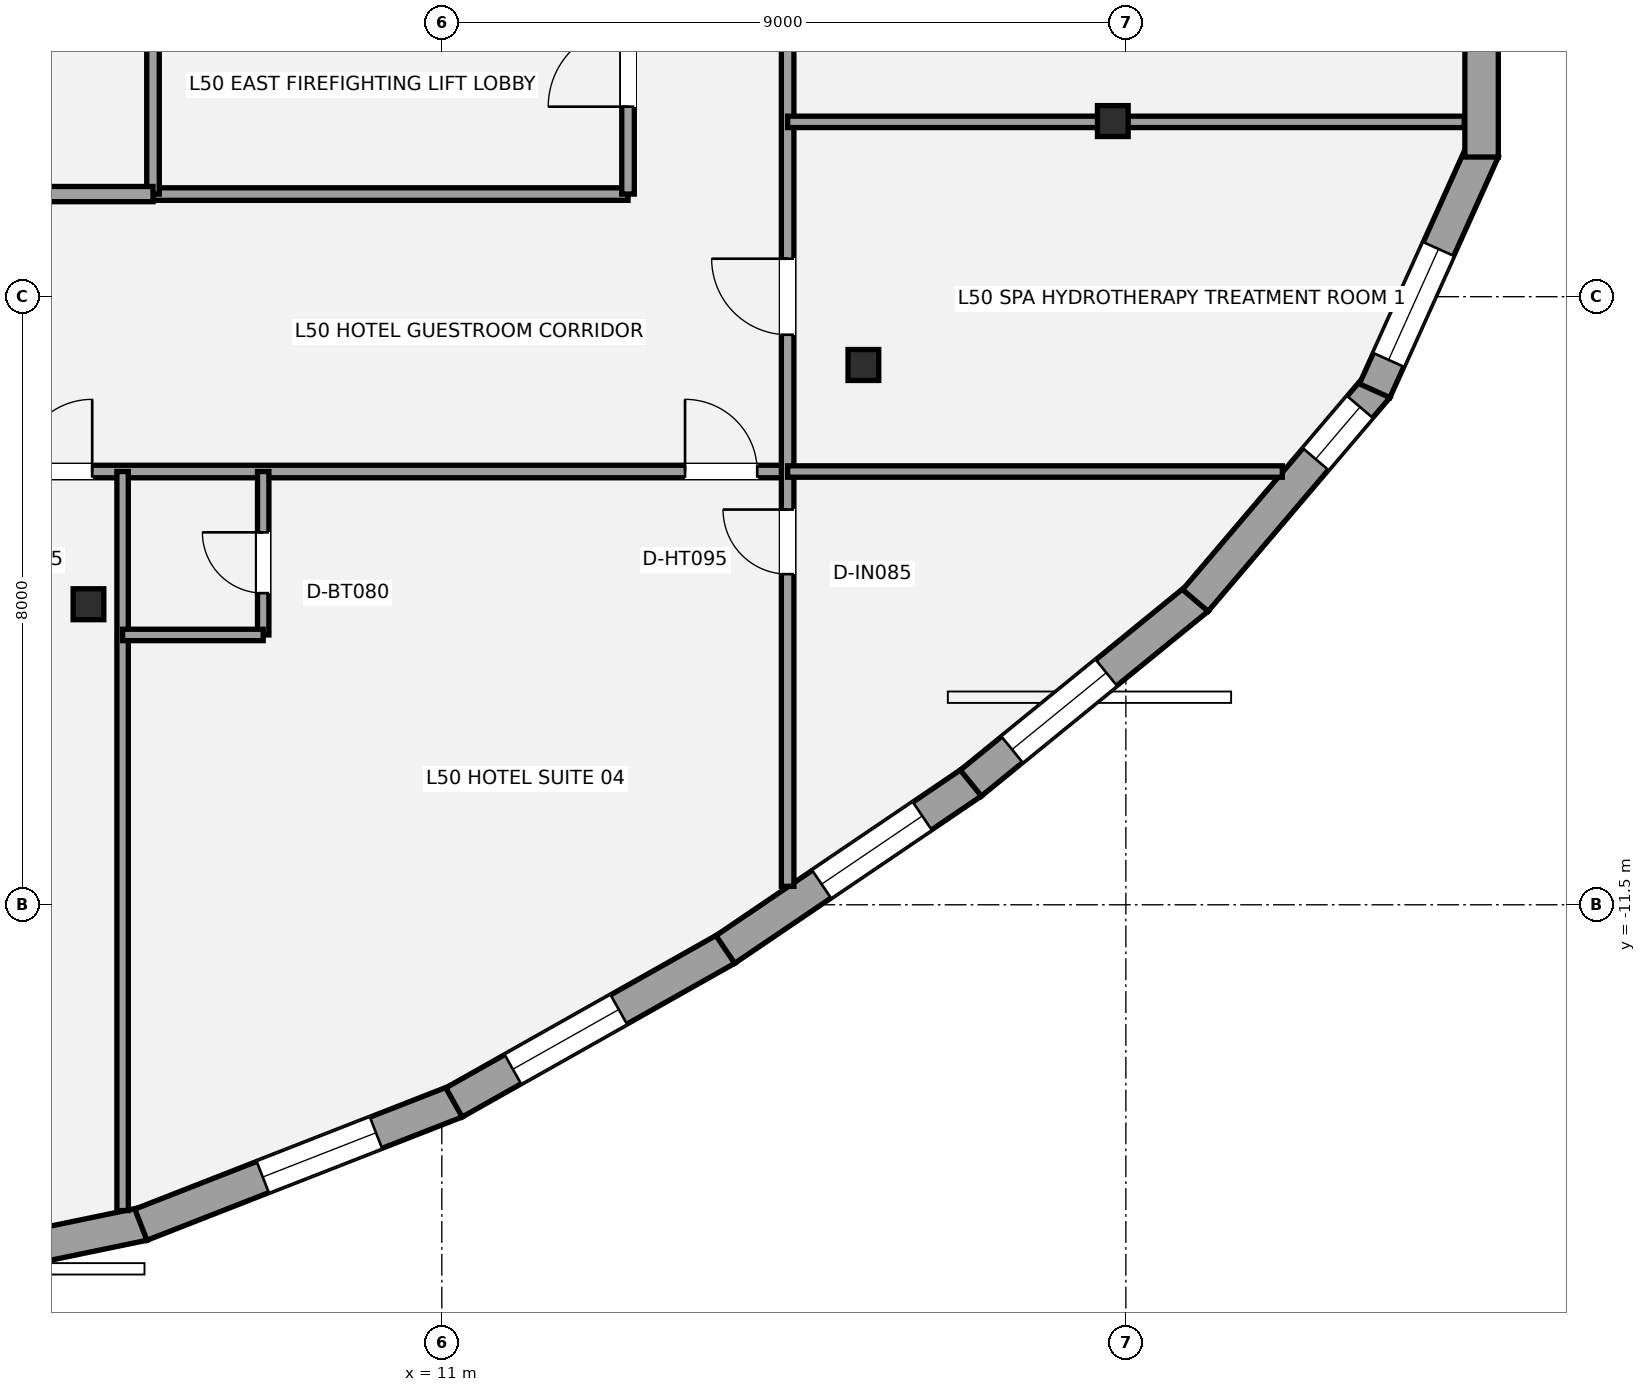
"""IFC4 building model, lengths in metres.
Left out: names, types, materials, properties, quantities, classifications, styles, units other than length and angle.
Written with IfcOpenShell. Run it as: python <this file> out.ifc"""

import sys

from ifc_helpers import new_model, si_unit, direction, frame, frame_2d, origin, origin_2d, place, context, subcontext, project, spatial, rectangle, i_section, extrude, element, fill, save


model = new_model("IFC4")
c1 = context("Model", 3, precision=1e-05, world=origin(), true_north=direction((0.0, 1.0)))
c2 = subcontext(c1, "Body", "Model", "MODEL_VIEW")
j1 = project(units=[si_unit("LENGTHUNIT", "METRE"), si_unit("PLANEANGLEUNIT", "RADIAN")], contexts=[c1])
p1 = place(None, origin())
s1 = spatial("IfcSite", under=j1, at=p1, CompositionType="ELEMENT")
p2 = place(p1, origin())
s2 = spatial("IfcBuilding", under=s1, at=p2, CompositionType="ELEMENT")
p3 = place(p2, frame((0.0, 0.0, 182.2)))
s3 = spatial("IfcBuildingStorey", under=s2, at=p3, CompositionType="ELEMENT", Elevation=182.2)
for number, where, z_axis, x_axis in (
    (1, (6.351, -7.546, 0.0), (0.0, 0.0, 1.0), (1.0, 0.0, 0.0)),
    (2, (16.547, -4.398, 0.0), (0.0, 0.0, 1.0), (1.0, 0.0, 0.0)),
    (3, (19.828, -1.189, 0.0), (0.0, 0.0, 1.0), (1.0, 0.0, 0.0)),
):
    element("IfcColumn", number, at=place(p3, frame(where, z_axis=z_axis, x_axis=x_axis)), inside=s3, PredefinedType="COLUMN", context=c2, shape_type="SweptSolid", body=[
        extrude(i_section(OverallWidth=0.404, OverallDepth=0.407, WebThickness=0.027, FlangeThickness=0.044, at=origin_2d()), origin(), (0.0, 0.0, 1.0), 3.2),
    ])
p4 = place(p3, frame((7.076, -15.698, 0.0), z_axis=(0.0, 0.0, 1.0), x_axis=(-0.979222564836, -0.202788482206, 0.0)))
e4 = element("IfcWall", 4, at=p4, inside=s3, PredefinedType="STANDARD", context=c2, shape_type="SweptSolid", body=[
    extrude(rectangle(XDim=4.768, YDim=0.44, at=frame_2d((2.384, 0.0))), origin(), (0.0, 0.0, 1.0), 2.315),
])
p5 = place(p4, frame((1.781, 0.0, 0.58)))
e5 = element("IfcOpeningElement", 5, at=p5, cuts=e4, PredefinedType="OPENING", context=c2, shape_type="SweptSolid", body=[
    extrude(rectangle(XDim=1.6, YDim=1.55, at=frame_2d((0.8, 0.775))), frame((0.0, 0.23, 0.0), z_axis=(0.0, -1.0, 0.0), x_axis=(1.0, 0.0, 0.0)), (0.0, 0.0, 1.0), 0.46),
])
p6 = place(p3, frame((11.188, -14.087, 0.0), z_axis=(0.0, 0.0, 1.0), x_axis=(-0.93133333838, -0.364167836062, 0.0)))
e6 = element("IfcWall", 6, at=p6, inside=s3, PredefinedType="STANDARD", context=c2, shape_type="SweptSolid", body=[
    extrude(rectangle(XDim=4.454, YDim=0.44, at=frame_2d((2.227, 0.0))), origin(), (0.0, 0.0, 1.0), 2.315),
])
p7 = place(p6, frame((1.132, 0.0, 0.58)))
e7 = element("IfcOpeningElement", 7, at=p7, cuts=e6, PredefinedType="OPENING", context=c2, shape_type="SweptSolid", body=[
    extrude(rectangle(XDim=1.6, YDim=1.55, at=frame_2d((0.8, 0.775))), frame((0.0, 0.23, 0.0), z_axis=(0.0, -1.0, 0.0), x_axis=(1.0, 0.0, 0.0)), (0.0, 0.0, 1.0), 0.46),
])
p8 = place(p3, frame((14.746, -12.078, 0.0), z_axis=(0.0, 0.0, 1.0), x_axis=(-0.871039635509, -0.491212737388, 0.0)))
e8 = element("IfcWall", 8, at=p8, inside=s3, PredefinedType="STANDARD", context=c2, shape_type="SweptSolid", body=[
    extrude(rectangle(XDim=4.116, YDim=0.44, at=frame_2d((2.058, 0.0))), origin(), (0.0, 0.0, 1.0), 2.315),
])
p9 = place(p8, frame((1.627, 0.0, 0.58)))
e9 = element("IfcOpeningElement", 9, at=p9, cuts=e8, PredefinedType="OPENING", context=c2, shape_type="SweptSolid", body=[
    extrude(rectangle(XDim=1.6, YDim=1.55, at=frame_2d((0.8, 0.775))), frame((0.0, 0.23, 0.0), z_axis=(0.0, -1.0, 0.0), x_axis=(1.0, 0.0, 0.0)), (0.0, 0.0, 1.0), 0.46),
])
p10 = place(p3, frame((17.976, -9.888, 0.0), z_axis=(0.0, 0.0, 1.0), x_axis=(-0.827733986143, -0.561120707321, 0.0)))
e10 = element("IfcWall", 10, at=p10, inside=s3, PredefinedType="STANDARD", context=c2, shape_type="SweptSolid", body=[
    extrude(rectangle(XDim=3.921, YDim=0.44, at=frame_2d((1.96, 0.0))), origin(), (0.0, 0.0, 1.0), 2.315),
])
p11 = place(p10, frame((0.791, 0.0, 0.58)))
e11 = element("IfcOpeningElement", 11, at=p11, cuts=e10, PredefinedType="OPENING", context=c2, shape_type="SweptSolid", body=[
    extrude(rectangle(XDim=1.6, YDim=1.55, at=frame_2d((0.8, 0.775))), frame((0.0, 0.23, 0.0), z_axis=(0.0, -1.0, 0.0), x_axis=(1.0, 0.0, 0.0)), (0.0, 0.0, 1.0), 0.46),
])
p12 = place(p3, frame((20.943, -7.469, 0.0), z_axis=(0.0, 0.0, 1.0), x_axis=(-0.77522232587, -0.631688487684, 0.0)))
e12 = element("IfcWall", 12, at=p12, inside=s3, PredefinedType="STANDARD", context=c2, shape_type="SweptSolid", body=[
    extrude(rectangle(XDim=3.847, YDim=0.44, at=frame_2d((1.924, 0.0))), origin(), (0.0, 0.0, 1.0), 2.315),
])
p13 = place(p12, frame((1.548, 0.0, 0.58)))
e13 = element("IfcOpeningElement", 13, at=p13, cuts=e12, PredefinedType="OPENING", context=c2, shape_type="SweptSolid", body=[
    extrude(rectangle(XDim=1.6, YDim=1.55, at=frame_2d((0.8, 0.775))), frame((0.0, 0.23, 0.0), z_axis=(0.0, -1.0, 0.0), x_axis=(1.0, 0.0, 0.0)), (0.0, 0.0, 1.0), 0.46),
])
p14 = place(p3, frame((23.307, -4.685, 0.0), z_axis=(0.0, 0.0, 1.0), x_axis=(-0.648014991522, -0.761627580096, 0.0)))
e14 = element("IfcWall", 14, at=p14, inside=s3, PredefinedType="STANDARD", context=c2, shape_type="SweptSolid", body=[
    extrude(rectangle(XDim=3.692, YDim=0.44, at=frame_2d((1.846, 0.0))), origin(), (0.0, 0.0, 1.0), 2.315),
])
p15 = place(p14, frame((0.35, 0.0, 0.58)))
e15 = element("IfcOpeningElement", 15, at=p15, cuts=e14, PredefinedType="OPENING", context=c2, shape_type="SweptSolid", body=[
    extrude(rectangle(XDim=0.9, YDim=1.35, at=frame_2d((0.45, 0.675))), frame((0.0, 0.23, 0.0), z_axis=(0.0, -1.0, 0.0), x_axis=(1.0, 0.0, 0.0)), (0.0, 0.0, 1.0), 0.46),
])
p16 = place(p3, frame((24.7, -1.572, 0.0), z_axis=(0.0, 0.0, 1.0), x_axis=(-0.410812065386, -0.911720048553, 0.0)))
e16 = element("IfcWall", 16, at=p16, inside=s3, PredefinedType="STANDARD", context=c2, shape_type="SweptSolid", body=[
    extrude(rectangle(XDim=3.471, YDim=0.44, at=frame_2d((1.736, 0.0))), origin(), (0.0, 0.0, 1.0), 2.315),
])
p17 = place(p16, frame((1.426, 0.0, 0.58)))
e17 = element("IfcOpeningElement", 17, at=p17, cuts=e16, PredefinedType="OPENING", context=c2, shape_type="SweptSolid", body=[
    extrude(rectangle(XDim=1.6, YDim=1.55, at=frame_2d((0.8, 0.775))), frame((0.0, 0.23, 0.0), z_axis=(0.0, -1.0, 0.0), x_axis=(1.0, 0.0, 0.0)), (0.0, 0.0, 1.0), 0.46),
])
p18 = place(p3, frame((24.68, 1.663, 0.0), z_axis=(0.0, 0.0, 1.0), x_axis=(0.0, -1.0, 0.0)))
e18 = element("IfcWall", 18, at=p18, inside=s3, PredefinedType="STANDARD", context=c2, shape_type="SweptSolid", body=[
    extrude(rectangle(XDim=3.325, YDim=0.44, at=frame_2d((1.663, 0.0))), origin(), (0.0, 0.0, 1.0), 2.315),
])
p19 = place(p18, frame((0.298, 0.0, 0.58)))
e19 = element("IfcOpeningElement", 19, at=p19, cuts=e18, PredefinedType="OPENING", context=c2, shape_type="SweptSolid", body=[
    extrude(rectangle(XDim=1.6, YDim=1.55, at=frame_2d((0.8, 0.775))), frame((0.0, 0.23, 0.0), z_axis=(0.0, -1.0, 0.0), x_axis=(1.0, 0.0, 0.0)), (0.0, 0.0, 1.0), 0.46),
])
p20 = place(p3, frame((7.2, -2.15, 0.0), z_axis=(0.0, 0.0, 1.0), x_axis=(1.0, 0.0, 0.0)))
e20 = element("IfcWall", 20, at=p20, inside=s3, PredefinedType="PARTITIONING", context=c2, shape_type="SweptSolid", body=[
    extrude(rectangle(XDim=6.25, YDim=0.165, at=frame_2d((3.125, 0.0))), origin(), (0.0, 0.0, 1.0), 3.02),
])
p21 = place(p3, frame((7.2, -2.15, 0.0), z_axis=(0.0, 0.0, 1.0), x_axis=(0.0, 1.0, 0.0)))
e21 = element("IfcWall", 21, at=p21, inside=s3, PredefinedType="PARTITIONING", context=c2, shape_type="SweptSolid", body=[
    extrude(rectangle(XDim=3.4, YDim=0.165, at=frame_2d((1.7, 0.0))), origin(), (0.0, 0.0, 1.0), 2.473),
])
p22 = place(p3, frame((13.45, -2.15, 0.0), z_axis=(0.0, 0.0, 1.0), x_axis=(0.0, 1.0, 0.0)))
e22 = element("IfcWall", 22, at=p22, inside=s3, PredefinedType="PARTITIONING", context=c2, shape_type="SweptSolid", body=[
    extrude(rectangle(XDim=3.4, YDim=0.165, at=frame_2d((1.7, 0.0))), origin(), (0.0, 0.0, 1.0), 2.473),
])
p23 = place(p22, frame((1.15, 0.0, 0.0)))
e23 = element("IfcOpeningElement", 23, at=p23, cuts=e22, PredefinedType="OPENING", context=c2, shape_type="SweptSolid", body=[
    extrude(rectangle(XDim=1.05, YDim=2.15, at=frame_2d((0.525, 1.075))), frame((0.0, 0.093, 0.0), z_axis=(0.0, -1.0, 0.0), x_axis=(1.0, 0.0, 0.0)), (0.0, 0.0, 1.0), 0.185),
])
p24 = place(p3, frame((4.95, -2.15, 0.0), z_axis=(0.0, 0.0, 1.0), x_axis=(1.0, 0.0, 0.0)))
e24 = element("IfcWall", 24, at=p24, inside=s3, PredefinedType="SOLIDWALL", context=c2, shape_type="SweptSolid", body=[
    extrude(rectangle(XDim=2.25, YDim=0.2, at=frame_2d((1.125, 0.0))), origin(), (0.0, 0.0, 1.0), 3.02),
])
p25 = place(p3, frame((-15.55, -5.8, 0.0), z_axis=(0.0, 0.0, 1.0), x_axis=(1.0, 0.0, 0.0)))
e25 = element("IfcWall", 25, at=p25, inside=s3, PredefinedType="PARTITIONING", context=c2, shape_type="SweptSolid", body=[
    extrude(rectangle(XDim=31.1, YDim=0.165, at=frame_2d((15.55, 0.0))), origin(), (0.0, 0.0, 1.0), 2.398),
])
p26 = place(p25, frame((5.4, 0.0, 0.0)))
e26 = element("IfcOpeningElement", 26, at=p26, cuts=e25, PredefinedType="OPENING", context=c2, shape_type="SweptSolid", body=[
    extrude(rectangle(XDim=0.95, YDim=2.15, at=frame_2d((0.475, 1.075))), frame((0.0, 0.093, 0.0), z_axis=(0.0, -1.0, 0.0), x_axis=(1.0, 0.0, 0.0)), (0.0, 0.0, 1.0), 0.185),
])
p27 = place(p25, frame((13.2, 0.0, 0.0)))
e27 = element("IfcOpeningElement", 27, at=p27, cuts=e25, PredefinedType="OPENING", context=c2, shape_type="SweptSolid", body=[
    extrude(rectangle(XDim=0.95, YDim=2.15, at=frame_2d((0.475, 1.075))), frame((0.0, 0.093, 0.0), z_axis=(0.0, -1.0, 0.0), x_axis=(1.0, 0.0, 0.0)), (0.0, 0.0, 1.0), 0.185),
])
p28 = place(p25, frame((21.0, 0.0, 0.0)))
e28 = element("IfcOpeningElement", 28, at=p28, cuts=e25, PredefinedType="OPENING", context=c2, shape_type="SweptSolid", body=[
    extrude(rectangle(XDim=0.95, YDim=2.15, at=frame_2d((0.475, 1.075))), frame((0.0, 0.093, 0.0), z_axis=(0.0, -1.0, 0.0), x_axis=(1.0, 0.0, 0.0)), (0.0, 0.0, 1.0), 0.185),
])
p29 = place(p25, frame((29.75, 0.0, 0.0)))
e29 = element("IfcOpeningElement", 29, at=p29, cuts=e25, PredefinedType="OPENING", context=c2, shape_type="SweptSolid", body=[
    extrude(rectangle(XDim=0.95, YDim=2.15, at=frame_2d((0.475, 1.075))), frame((0.0, 0.093, 0.0), z_axis=(0.0, -1.0, 0.0), x_axis=(1.0, 0.0, 0.0)), (0.0, 0.0, 1.0), 0.185),
])
p30 = place(p3, frame((15.55, -11.257, 0.0), z_axis=(0.0, 0.0, 1.0), x_axis=(0.0, 1.0, 0.0)))
e30 = element("IfcWall", 30, at=p30, inside=s3, PredefinedType="PARTITIONING", context=c2, shape_type="SweptSolid", body=[
    extrude(rectangle(XDim=18.807, YDim=0.165, at=frame_2d((9.403, 0.0))), origin(), (0.0, 0.0, 1.0), 2.473),
])
p31 = place(p30, frame((4.106, 0.0, 0.0)))
e31 = element("IfcOpeningElement", 31, at=p31, cuts=e30, PredefinedType="OPENING", context=c2, shape_type="SweptSolid", body=[
    extrude(rectangle(XDim=0.85, YDim=2.1, at=frame_2d((0.425, 1.05))), frame((0.0, 0.093, 0.0), z_axis=(0.0, -1.0, 0.0), x_axis=(1.0, 0.0, 0.0)), (0.0, 0.0, 1.0), 0.185),
])
p32 = place(p30, frame((7.257, 0.0, 0.0)))
e32 = element("IfcOpeningElement", 32, at=p32, cuts=e30, PredefinedType="OPENING", context=c2, shape_type="SweptSolid", body=[
    extrude(rectangle(XDim=1.0, YDim=2.15, at=frame_2d((0.5, 1.075))), frame((0.0, 0.093, 0.0), z_axis=(0.0, -1.0, 0.0), x_axis=(1.0, 0.0, 0.0)), (0.0, 0.0, 1.0), 0.185),
])
p33 = place(p30, frame((11.656, 0.0, 0.0)))
e33 = element("IfcOpeningElement", 33, at=p33, cuts=e30, PredefinedType="OPENING", context=c2, shape_type="SweptSolid", body=[
    extrude(rectangle(XDim=1.0, YDim=2.15, at=frame_2d((0.5, 1.075))), frame((0.0, 0.093, 0.0), z_axis=(0.0, -1.0, 0.0), x_axis=(1.0, 0.0, 0.0)), (0.0, 0.0, 1.0), 0.185),
])
p34 = place(p30, frame((16.031, 0.0, 0.0)))
e34 = element("IfcOpeningElement", 34, at=p34, cuts=e30, PredefinedType="OPENING", context=c2, shape_type="SweptSolid", body=[
    extrude(rectangle(XDim=1.0, YDim=2.15, at=frame_2d((0.5, 1.075))), frame((0.0, 0.093, 0.0), z_axis=(0.0, -1.0, 0.0), x_axis=(1.0, 0.0, 0.0)), (0.0, 0.0, 1.0), 0.185),
])
p35 = place(p3, frame((15.55, -5.8, 0.0), z_axis=(0.0, 0.0, 1.0), x_axis=(1.0, 0.0, 0.0)))
e35 = element("IfcWall", 35, at=p35, inside=s3, PredefinedType="PLUMBINGWALL", context=c2, shape_type="SweptSolid", body=[
    extrude(rectangle(XDim=6.509, YDim=0.15, at=frame_2d((3.254, 0.0))), origin(), (0.0, 0.0, 1.0), 2.473),
])
p36 = place(p3, frame((6.8, -15.523, 0.0), z_axis=(0.0, 0.0, 1.0), x_axis=(0.0, 1.0, 0.0)))
e36 = element("IfcWall", 36, at=p36, inside=s3, PredefinedType="PLUMBINGWALL", context=c2, shape_type="SweptSolid", body=[
    extrude(rectangle(XDim=9.723, YDim=0.15, at=frame_2d((4.861, 0.0))), origin(), (0.0, 0.0, 1.0), 2.473),
])
p37 = place(p3, frame((8.65, -7.95, 0.0), z_axis=(0.0, 0.0, 1.0), x_axis=(0.0, 1.0, 0.0)))
e37 = element("IfcWall", 37, at=p37, inside=s3, PredefinedType="PLUMBINGWALL", context=c2, shape_type="SweptSolid", body=[
    extrude(rectangle(XDim=2.15, YDim=0.15, at=frame_2d((1.075, 0.0))), origin(), (0.0, 0.0, 1.0), 3.02),
])
p38 = place(p37, frame((0.55, 0.0, 0.0)))
e38 = element("IfcOpeningElement", 38, at=p38, cuts=e37, PredefinedType="OPENING", context=c2, shape_type="SweptSolid", body=[
    extrude(rectangle(XDim=0.8, YDim=2.1, at=frame_2d((0.4, 1.05))), frame((0.0, 0.085, 0.0), z_axis=(0.0, -1.0, 0.0), x_axis=(1.0, 0.0, 0.0)), (0.0, 0.0, 1.0), 0.17),
])
p39 = place(p3, frame((6.8, -7.95, 0.0), z_axis=(0.0, 0.0, 1.0), x_axis=(1.0, 0.0, 0.0)))
e39 = element("IfcWall", 39, at=p39, inside=s3, PredefinedType="PLUMBINGWALL", context=c2, shape_type="SweptSolid", body=[
    extrude(rectangle(XDim=1.85, YDim=0.15, at=frame_2d((0.925, 0.0))), origin(), (0.0, 0.0, 1.0), 3.02),
])
p40 = place(p3, frame((15.55, -1.2, 0.0), z_axis=(0.0, 0.0, 1.0), x_axis=(1.0, 0.0, 0.0)))
e40 = element("IfcWall", 40, at=p40, inside=s3, PredefinedType="PLUMBINGWALL", context=c2, shape_type="SweptSolid", body=[
    extrude(rectangle(XDim=8.902, YDim=0.15, at=frame_2d((4.451, 0.0))), origin(), (0.0, 0.0, 1.0), 2.398),
])
p41 = place(p7, origin())
e41 = element("IfcWindow", 41, at=p41, inside=s3, PartitioningType="SINGLE_PANEL", PredefinedType="WINDOW", context=c2, shape_type="SweptSolid", body=[
    extrude(rectangle(XDim=1.6, YDim=1.55, at=frame_2d((0.8, 0.775))), frame((0.0, -0.01, 0.0), z_axis=(0.0, -1.0, 0.0), x_axis=(1.0, 0.0, 0.0)), (0.0, 0.0, 1.0), 0.06),
])
fill(e7, e41)
p42 = place(p9, origin())
e42 = element("IfcWindow", 42, at=p42, inside=s3, PartitioningType="SINGLE_PANEL", PredefinedType="WINDOW", context=c2, shape_type="SweptSolid", body=[
    extrude(rectangle(XDim=1.6, YDim=1.55, at=frame_2d((0.8, 0.775))), frame((0.0, -0.01, 0.0), z_axis=(0.0, -1.0, 0.0), x_axis=(1.0, 0.0, 0.0)), (0.0, 0.0, 1.0), 0.06),
])
fill(e9, e42)
p43 = place(p11, origin())
e43 = element("IfcWindow", 43, at=p43, inside=s3, PartitioningType="SINGLE_PANEL", PredefinedType="WINDOW", context=c2, shape_type="SweptSolid", body=[
    extrude(rectangle(XDim=1.6, YDim=1.55, at=frame_2d((0.8, 0.775))), frame((0.0, -0.01, 0.0), z_axis=(0.0, -1.0, 0.0), x_axis=(1.0, 0.0, 0.0)), (0.0, 0.0, 1.0), 0.06),
])
fill(e11, e43)
p44 = place(p13, origin())
e44 = element("IfcWindow", 44, at=p44, inside=s3, PartitioningType="SINGLE_PANEL", PredefinedType="WINDOW", context=c2, shape_type="SweptSolid", body=[
    extrude(rectangle(XDim=1.6, YDim=1.55, at=frame_2d((0.8, 0.775))), frame((0.0, -0.01, 0.0), z_axis=(0.0, -1.0, 0.0), x_axis=(1.0, 0.0, 0.0)), (0.0, 0.0, 1.0), 0.06),
])
fill(e13, e44)
p45 = place(p15, origin())
e45 = element("IfcWindow", 45, at=p45, inside=s3, PartitioningType="SINGLE_PANEL", PredefinedType="WINDOW", context=c2, shape_type="SweptSolid", body=[
    extrude(rectangle(XDim=0.9, YDim=1.35, at=frame_2d((0.45, 0.675))), frame((0.0, -0.01, 0.0), z_axis=(0.0, -1.0, 0.0), x_axis=(1.0, 0.0, 0.0)), (0.0, 0.0, 1.0), 0.06),
])
fill(e15, e45)
p46 = place(p17, origin())
e46 = element("IfcWindow", 46, at=p46, inside=s3, PartitioningType="SINGLE_PANEL", PredefinedType="WINDOW", context=c2, shape_type="SweptSolid", body=[
    extrude(rectangle(XDim=1.6, YDim=1.55, at=frame_2d((0.8, 0.775))), frame((0.0, -0.01, 0.0), z_axis=(0.0, -1.0, 0.0), x_axis=(1.0, 0.0, 0.0)), (0.0, 0.0, 1.0), 0.06),
])
fill(e17, e46)
p47 = place(p23, origin())
e47 = element("IfcDoor", 47, at=p47, inside=s3, OperationType="SINGLE_SWING_LEFT", PredefinedType="DOOR", context=c2, shape_type="SweptSolid", body=[
    extrude(rectangle(XDim=1.05, YDim=2.15, at=frame_2d((0.525, 1.075))), frame((0.0, 0.025, 0.0), z_axis=(0.0, -1.0, 0.0), x_axis=(1.0, 0.0, 0.0)), (0.0, 0.0, 1.0), 0.05),
])
fill(e23, e47)
p48 = place(p31, origin())
e48 = element("IfcDoor", 48, at=p48, inside=s3, OperationType="SINGLE_SWING_RIGHT", PredefinedType="DOOR", context=c2, shape_type="SweptSolid", body=[
    extrude(rectangle(XDim=0.85, YDim=2.1, at=frame_2d((0.425, 1.05))), frame((0.0, 0.025, 0.0), z_axis=(0.0, -1.0, 0.0), x_axis=(1.0, 0.0, 0.0)), (0.0, 0.0, 1.0), 0.05),
])
fill(e31, e48)
p49 = place(p28, origin())
e49 = element("IfcDoor", 49, at=p49, inside=s3, OperationType="SINGLE_SWING_RIGHT", PredefinedType="DOOR", context=c2, shape_type="SweptSolid", body=[
    extrude(rectangle(XDim=0.95, YDim=2.15, at=frame_2d((0.475, 1.075))), frame((0.0, 0.025, 0.0), z_axis=(0.0, -1.0, 0.0), x_axis=(1.0, 0.0, 0.0)), (0.0, 0.0, 1.0), 0.05),
])
fill(e28, e49)
p50 = place(p29, origin())
e50 = element("IfcDoor", 50, at=p50, inside=s3, OperationType="SINGLE_SWING_LEFT", PredefinedType="DOOR", context=c2, shape_type="SweptSolid", body=[
    extrude(rectangle(XDim=0.95, YDim=2.15, at=frame_2d((0.475, 1.075))), frame((0.0, 0.025, 0.0), z_axis=(0.0, -1.0, 0.0), x_axis=(1.0, 0.0, 0.0)), (0.0, 0.0, 1.0), 0.05),
])
fill(e29, e50)
p51 = place(p38, origin())
e51 = element("IfcDoor", 51, at=p51, inside=s3, OperationType="SINGLE_SWING_RIGHT", PredefinedType="DOOR", context=c2, shape_type="SweptSolid", body=[
    extrude(rectangle(XDim=0.8, YDim=2.1, at=frame_2d((0.4, 1.05))), frame((0.0, 0.025, 0.0), z_axis=(0.0, -1.0, 0.0), x_axis=(1.0, 0.0, 0.0)), (0.0, 0.0, 1.0), 0.05),
])
fill(e38, e51)
p52 = place(p32, origin())
e52 = element("IfcDoor", 52, at=p52, inside=s3, OperationType="SINGLE_SWING_RIGHT", PredefinedType="DOOR", context=c2, shape_type="SweptSolid", body=[
    extrude(rectangle(XDim=1.0, YDim=2.15, at=frame_2d((0.5, 1.075))), frame((0.0, 0.025, 0.0), z_axis=(0.0, -1.0, 0.0), x_axis=(1.0, 0.0, 0.0)), (0.0, 0.0, 1.0), 0.05),
])
fill(e32, e52)
save(model, sys.argv[1])
